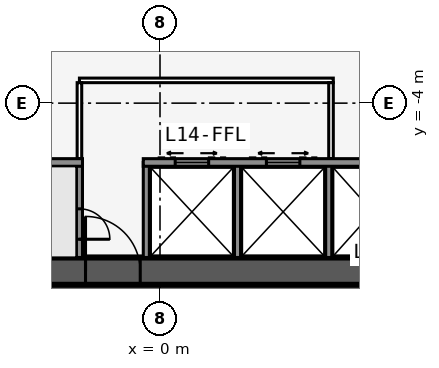
"""IFC4 building model, lengths in metres.
Left out: names, types, materials, properties, quantities, classifications, styles, units other than length and angle.
Written with IfcOpenShell. Run it as: python <this file> out.ifc"""

import sys

from ifc_helpers import new_model, si_unit, direction, frame, frame_2d, origin, place, context, subcontext, project, spatial, rectangle, extrude, element, fill, save


model = new_model("IFC4")
c1 = context("Model", 3, precision=1e-05, world=origin(), true_north=direction((0.0, 1.0)))
c2 = subcontext(c1, "Body", "Model", "MODEL_VIEW")
j1 = project(units=[si_unit("LENGTHUNIT", "METRE"), si_unit("PLANEANGLEUNIT", "RADIAN")], contexts=[c1])
p1 = place(None, origin())
s1 = spatial("IfcSite", under=j1, at=p1, CompositionType="ELEMENT")
p2 = place(p1, origin())
s2 = spatial("IfcBuilding", under=s1, at=p2, CompositionType="ELEMENT")
p3 = place(p2, frame((0.0, 0.0, 59.1)))
s3 = spatial("IfcBuildingStorey", under=s2, at=p3, CompositionType="ELEMENT", Elevation=59.1)
p4 = place(p3, frame((-16.5, -9.526, 0.0), z_axis=(0.0, 0.0, 1.0), x_axis=(1.0, 0.0, 0.0)))
e1 = element("IfcWall", 1, at=p4, inside=s3, PredefinedType="SHEAR", context=c2, shape_type="SweptSolid", body=[
    extrude(rectangle(XDim=33.0, YDim=0.9, at=frame_2d((16.5, 0.0))), origin(), (0.0, 0.0, 1.0), 3.4),
])
p5 = place(p4, frame((14.05, 0.0, 0.0)))
e2 = element("IfcOpeningElement", 2, at=p5, cuts=e1, PredefinedType="OPENING", context=c2, shape_type="SweptSolid", body=[
    extrude(rectangle(XDim=1.8, YDim=2.13, at=frame_2d((0.9, 1.065))), frame((0.0, 0.46, 0.0), z_axis=(0.0, -1.0, 0.0), x_axis=(1.0, 0.0, 0.0)), (0.0, 0.0, 1.0), 0.92),
])
p6 = place(p3, frame((-10.183, -5.951, 0.0), z_axis=(0.0, 0.0, 1.0), x_axis=(1.0, 0.0, 0.0)))
e3 = element("IfcWall", 3, at=p6, inside=s3, PredefinedType="SOLIDWALL", context=c2, shape_type="SweptSolid", body=[
    extrude(rectangle(XDim=7.633, YDim=0.25, at=frame_2d((3.816, 0.0))), origin(), (0.0, 0.0, 1.0), 3.235),
])
p7 = place(p3, frame((-0.55, -5.951, 0.0), z_axis=(0.0, 0.0, 1.0), x_axis=(1.0, 0.0, 0.0)))
e4 = element("IfcWall", 4, at=p7, inside=s3, PredefinedType="SOLIDWALL", context=c2, shape_type="SweptSolid", body=[
    extrude(rectangle(XDim=10.733, YDim=0.25, at=frame_2d((5.366, 0.0))), origin(), (0.0, 0.0, 1.0), 3.235),
])
p8 = place(p7, frame((9.314, 0.0, 0.0)))
e5 = element("IfcOpeningElement", 5, at=p8, cuts=e4, PredefinedType="OPENING", context=c2, shape_type="SweptSolid", body=[
    extrude(rectangle(XDim=0.9, YDim=2.13, at=frame_2d((0.45, 1.065))), frame((0.0, 0.135, 0.0), z_axis=(0.0, -1.0, 0.0), x_axis=(1.0, 0.0, 0.0)), (0.0, 0.0, 1.0), 0.27),
])
p9 = place(p7, frame((1.05, 0.0, 0.0)))
e6 = element("IfcOpeningElement", 6, at=p9, cuts=e4, PredefinedType="OPENING", context=c2, shape_type="SweptSolid", body=[
    extrude(rectangle(XDim=1.1, YDim=2.13, at=frame_2d((0.55, 1.065))), frame((0.0, 0.135, 0.0), z_axis=(0.0, -1.0, 0.0), x_axis=(1.0, 0.0, 0.0)), (0.0, 0.0, 1.0), 0.27),
])
p10 = place(p7, frame((4.05, 0.0, 0.0)))
e7 = element("IfcOpeningElement", 7, at=p10, cuts=e4, PredefinedType="OPENING", context=c2, shape_type="SweptSolid", body=[
    extrude(rectangle(XDim=1.1, YDim=2.13, at=frame_2d((0.55, 1.065))), frame((0.0, 0.135, 0.0), z_axis=(0.0, -1.0, 0.0), x_axis=(1.0, 0.0, 0.0)), (0.0, 0.0, 1.0), 0.27),
])
p11 = place(p3, frame((-2.65, -5.951, 0.0), z_axis=(0.0, 0.0, 1.0), x_axis=(0.0, -1.0, 0.0)))
e8 = element("IfcWall", 8, at=p11, inside=s3, PredefinedType="SOLIDWALL", context=c2, shape_type="SweptSolid", body=[
    extrude(rectangle(XDim=3.125, YDim=0.2, at=frame_2d((1.562, 0.0))), origin(), (0.0, 0.0, 1.0), 3.235),
])
p12 = place(p11, frame((1.525, 0.0, 0.0)))
e9 = element("IfcOpeningElement", 9, at=p12, cuts=e8, PredefinedType="OPENING", context=c2, shape_type="SweptSolid", body=[
    extrude(rectangle(XDim=1.0, YDim=2.13, at=frame_2d((0.5, 1.065))), frame((0.0, 0.11, 0.0), z_axis=(0.0, -1.0, 0.0), x_axis=(1.0, 0.0, 0.0)), (0.0, 0.0, 1.0), 0.22),
])
for number, where, z_axis, x_axis in (
    (10, (-0.45, -5.951, 0.0), (0.0, 0.0, 1.0), (0.0, -1.0, 0.0)),
    (11, (2.55, -5.951, 0.0), (0.0, 0.0, 1.0), (0.0, -1.0, 0.0)),
    (12, (5.55, -5.951, 0.0), (0.0, 0.0, 1.0), (0.0, -1.0, 0.0)),
):
    element("IfcWall", number, at=place(p3, frame(where, z_axis=z_axis, x_axis=x_axis)), inside=s3, PredefinedType="SOLIDWALL", context=c2, shape_type="SweptSolid", body=[
        extrude(rectangle(XDim=3.125, YDim=0.2, at=frame_2d((1.562, 0.0))), origin(), (0.0, 0.0, 1.0), 3.235),
    ])
p13 = place(p3, frame((16.5, -9.526, 0.0), z_axis=(0.0, 0.0, 1.0), x_axis=(-0.499999749417, 0.866025548458, 0.0)))
e13 = element("IfcWall", 13, at=p13, inside=s3, PredefinedType="SHEAR", context=c2, shape_type="SweptSolid", body=[
    extrude(rectangle(XDim=33.0, YDim=0.9, at=frame_2d((16.5, 0.0))), origin(), (0.0, 0.0, 1.0), 3.4),
])
p14 = place(p13, frame((14.15, 0.0, 0.0)))
e14 = element("IfcOpeningElement", 14, at=p14, cuts=e13, PredefinedType="OPENING", context=c2, shape_type="SweptSolid", body=[
    extrude(rectangle(XDim=1.8, YDim=2.13, at=frame_2d((0.9, 1.065))), frame((0.0, 0.46, 0.0), z_axis=(0.0, -1.0, 0.0), x_axis=(1.0, 0.0, 0.0)), (0.0, 0.0, 1.0), 0.92),
])
p15 = place(p13, frame((12.6, 0.0, 0.0)))
e15 = element("IfcOpeningElement", 15, at=p15, cuts=e13, PredefinedType="OPENING", context=c2, shape_type="SweptSolid", body=[
    extrude(rectangle(XDim=1.0, YDim=2.13, at=frame_2d((0.5, 1.065))), frame((0.0, 0.46, 0.0), z_axis=(0.0, -1.0, 0.0), x_axis=(1.0, 0.0, 0.0)), (0.0, 0.0, 1.0), 0.92),
])
p16 = place(p3, frame((10.245, -5.843, 0.0), z_axis=(0.0, 0.0, 1.0), x_axis=(-0.499993009313, 0.866029439822, 0.0)))
e16 = element("IfcWall", 16, at=p16, inside=s3, PredefinedType="SOLIDWALL", context=c2, shape_type="SweptSolid", body=[
    extrude(rectangle(XDim=7.733, YDim=0.25, at=frame_2d((3.866, 0.0))), origin(), (0.0, 0.0, 1.0), 3.235),
])
p17 = place(p3, frame((0.0, 19.052, 0.0), z_axis=(0.0, 0.0, 1.0), x_axis=(-0.499999749417, -0.866025548458, 0.0)))
e17 = element("IfcWall", 17, at=p17, inside=s3, PredefinedType="SHEAR", context=c2, shape_type="SweptSolid", body=[
    extrude(rectangle(XDim=33.0, YDim=0.9, at=frame_2d((16.5, 0.0))), origin(), (0.0, 0.0, 1.0), 3.4),
])
p18 = place(p17, frame((14.15, 0.0, 0.0)))
e18 = element("IfcOpeningElement", 18, at=p18, cuts=e17, PredefinedType="OPENING", context=c2, shape_type="SweptSolid", body=[
    extrude(rectangle(XDim=1.8, YDim=2.13, at=frame_2d((0.9, 1.065))), frame((0.0, 0.46, 0.0), z_axis=(0.0, -1.0, 0.0), x_axis=(1.0, 0.0, 0.0)), (0.0, 0.0, 1.0), 0.92),
])
p19 = place(p17, frame((12.6, 0.0, 0.0)))
e19 = element("IfcOpeningElement", 19, at=p19, cuts=e17, PredefinedType="OPENING", context=c2, shape_type="SweptSolid", body=[
    extrude(rectangle(XDim=1.0, YDim=2.13, at=frame_2d((0.5, 1.065))), frame((0.0, 0.46, 0.0), z_axis=(0.0, -1.0, 0.0), x_axis=(1.0, 0.0, 0.0)), (0.0, 0.0, 1.0), 0.92),
])
p20 = place(p3, frame((20.027, -10.985, 0.0), z_axis=(0.0, 0.0, 1.0), x_axis=(-0.500001677587, 0.866024435227, 0.0)))
e20 = element("IfcWall", 20, at=p20, inside=s3, PredefinedType="PARTITIONING", context=c2, shape_type="SweptSolid", body=[
    extrude(rectangle(XDim=39.054, YDim=0.15, at=frame_2d((19.527, 0.0))), origin(), (0.0, 0.0, 1.0), 3.235),
])
p21 = place(p20, frame((0.352, 0.0, 0.0)))
e21 = element("IfcOpeningElement", 21, at=p21, cuts=e20, PredefinedType="OPENING", context=c2, shape_type="SweptSolid", body=[
    extrude(rectangle(XDim=0.95, YDim=2.13, at=frame_2d((0.475, 1.065))), frame((0.0, 0.085, 0.0), z_axis=(0.0, -1.0, 0.0), x_axis=(1.0, 0.0, 0.0)), (0.0, 0.0, 1.0), 0.17),
])
p22 = place(p20, frame((10.352, 0.0, 0.0)))
e22 = element("IfcOpeningElement", 22, at=p22, cuts=e20, PredefinedType="OPENING", context=c2, shape_type="SweptSolid", body=[
    extrude(rectangle(XDim=0.95, YDim=2.13, at=frame_2d((0.475, 1.065))), frame((0.0, 0.085, 0.0), z_axis=(0.0, -1.0, 0.0), x_axis=(1.0, 0.0, 0.0)), (0.0, 0.0, 1.0), 0.17),
])
p23 = place(p20, frame((17.152, 0.0, 0.0)))
e23 = element("IfcOpeningElement", 23, at=p23, cuts=e20, PredefinedType="OPENING", context=c2, shape_type="SweptSolid", body=[
    extrude(rectangle(XDim=0.95, YDim=2.13, at=frame_2d((0.475, 1.065))), frame((0.0, 0.085, 0.0), z_axis=(0.0, -1.0, 0.0), x_axis=(1.0, 0.0, 0.0)), (0.0, 0.0, 1.0), 0.17),
])
p24 = place(p20, frame((20.952, 0.0, 0.0)))
e24 = element("IfcOpeningElement", 24, at=p24, cuts=e20, PredefinedType="OPENING", context=c2, shape_type="SweptSolid", body=[
    extrude(rectangle(XDim=0.95, YDim=2.13, at=frame_2d((0.475, 1.065))), frame((0.0, 0.085, 0.0), z_axis=(0.0, -1.0, 0.0), x_axis=(1.0, 0.0, 0.0)), (0.0, 0.0, 1.0), 0.17),
])
p25 = place(p20, frame((27.752, 0.0, 0.0)))
e25 = element("IfcOpeningElement", 25, at=p25, cuts=e20, PredefinedType="OPENING", context=c2, shape_type="SweptSolid", body=[
    extrude(rectangle(XDim=0.95, YDim=2.13, at=frame_2d((0.475, 1.065))), frame((0.0, 0.085, 0.0), z_axis=(0.0, -1.0, 0.0), x_axis=(1.0, 0.0, 0.0)), (0.0, 0.0, 1.0), 0.17),
])
p26 = place(p20, frame((37.752, 0.0, 0.0)))
e26 = element("IfcOpeningElement", 26, at=p26, cuts=e20, PredefinedType="OPENING", context=c2, shape_type="SweptSolid", body=[
    extrude(rectangle(XDim=0.95, YDim=2.13, at=frame_2d((0.475, 1.065))), frame((0.0, 0.085, 0.0), z_axis=(0.0, -1.0, 0.0), x_axis=(1.0, 0.0, 0.0)), (0.0, 0.0, 1.0), 0.17),
])
p27 = place(p3, frame((-0.5, 24.636, 0.0), z_axis=(0.0, 0.0, 1.0), x_axis=(-0.500001915564, -0.86602429783, 0.0)))
e27 = element("IfcWall", 27, at=p27, inside=s3, PredefinedType="PARTITIONING", context=c2, shape_type="SweptSolid", body=[
    extrude(rectangle(XDim=42.172, YDim=0.15, at=frame_2d((21.086, 0.0))), origin(), (0.0, 0.0, 1.0), 3.235),
])
p28 = place(p27, frame((2.338, 0.0, 0.0)))
e28 = element("IfcOpeningElement", 28, at=p28, cuts=e27, PredefinedType="OPENING", context=c2, shape_type="SweptSolid", body=[
    extrude(rectangle(XDim=0.95, YDim=2.13, at=frame_2d((0.475, 1.065))), frame((0.0, 0.085, 0.0), z_axis=(0.0, -1.0, 0.0), x_axis=(1.0, 0.0, 0.0)), (0.0, 0.0, 1.0), 0.17),
])
p29 = place(p27, frame((12.511, 0.0, 0.0)))
e29 = element("IfcOpeningElement", 29, at=p29, cuts=e27, PredefinedType="OPENING", context=c2, shape_type="SweptSolid", body=[
    extrude(rectangle(XDim=0.95, YDim=2.13, at=frame_2d((0.475, 1.065))), frame((0.0, 0.085, 0.0), z_axis=(0.0, -1.0, 0.0), x_axis=(1.0, 0.0, 0.0)), (0.0, 0.0, 1.0), 0.17),
])
p30 = place(p27, frame((19.311, 0.0, 0.0)))
e30 = element("IfcOpeningElement", 30, at=p30, cuts=e27, PredefinedType="OPENING", context=c2, shape_type="SweptSolid", body=[
    extrude(rectangle(XDim=0.95, YDim=2.13, at=frame_2d((0.475, 1.065))), frame((0.0, 0.085, 0.0), z_axis=(0.0, -1.0, 0.0), x_axis=(1.0, 0.0, 0.0)), (0.0, 0.0, 1.0), 0.17),
])
p31 = place(p27, frame((28.111, 0.0, 0.0)))
e31 = element("IfcOpeningElement", 31, at=p31, cuts=e27, PredefinedType="OPENING", context=c2, shape_type="SweptSolid", body=[
    extrude(rectangle(XDim=0.95, YDim=2.13, at=frame_2d((0.475, 1.065))), frame((0.0, 0.085, 0.0), z_axis=(0.0, -1.0, 0.0), x_axis=(1.0, 0.0, 0.0)), (0.0, 0.0, 1.0), 0.17),
])
p32 = place(p27, frame((39.311, 0.0, 0.0)))
e32 = element("IfcOpeningElement", 32, at=p32, cuts=e27, PredefinedType="OPENING", context=c2, shape_type="SweptSolid", body=[
    extrude(rectangle(XDim=0.95, YDim=2.13, at=frame_2d((0.475, 1.065))), frame((0.0, 0.085, 0.0), z_axis=(0.0, -1.0, 0.0), x_axis=(1.0, 0.0, 0.0)), (0.0, 0.0, 1.0), 0.17),
])
p33 = place(p3, frame((-2.65, -3.251, 0.0), z_axis=(0.0, 0.0, 1.0), x_axis=(1.0, 0.0, 0.0)))
e33 = element("IfcWall", 33, at=p33, inside=s3, PredefinedType="PARTITIONING", context=c2, shape_type="SweptSolid", body=[
    extrude(rectangle(XDim=8.35, YDim=0.15, at=frame_2d((4.175, 0.0))), origin(), (0.0, 0.0, 1.0), 3.235),
])
for number, where, z_axis, x_axis in (
    (34, (-2.65, -5.826, 0.0), (0.0, 0.0, 1.0), (0.0, 1.0, 0.0)),
    (35, (5.625, -5.826, 0.0), (0.0, 0.0, 1.0), (0.0, 1.0, 0.0)),
):
    element("IfcWall", number, at=place(p3, frame(where, z_axis=z_axis, x_axis=x_axis)), inside=s3, PredefinedType="PARTITIONING", context=c2, shape_type="SweptSolid", body=[
        extrude(rectangle(XDim=2.5, YDim=0.15, at=frame_2d((1.25, 0.0))), origin(), (0.0, 0.0, 1.0), 3.235),
    ])
p34 = place(p5, origin())
e36 = element("IfcDoor", 36, at=p34, inside=s3, OperationType="DOUBLE_DOOR_SINGLE_SWING", PredefinedType="DOOR", context=c2, shape_type="SweptSolid", body=[
    extrude(rectangle(XDim=1.8, YDim=2.13, at=frame_2d((0.9, 1.065))), frame((0.0, 0.025, 0.0), z_axis=(0.0, -1.0, 0.0), x_axis=(1.0, 0.0, 0.0)), (0.0, 0.0, 1.0), 0.05),
])
fill(e2, e36)
p35 = place(p12, origin())
e37 = element("IfcDoor", 37, at=p35, inside=s3, OperationType="SINGLE_SWING_RIGHT", PredefinedType="DOOR", context=c2, shape_type="SweptSolid", body=[
    extrude(rectangle(XDim=1.0, YDim=2.13, at=frame_2d((0.5, 1.065))), frame((0.0, 0.025, 0.0), z_axis=(0.0, -1.0, 0.0), x_axis=(1.0, 0.0, 0.0)), (0.0, 0.0, 1.0), 0.05),
])
fill(e9, e37)
p36 = place(p9, origin())
e38 = element("IfcDoor", 38, at=p36, inside=s3, OperationType="DOUBLE_DOOR_SLIDING", PredefinedType="USERDEFINED", context=c2, shape_type="SweptSolid", body=[
    extrude(rectangle(XDim=1.1, YDim=2.13, at=frame_2d((0.55, 1.065))), frame((0.0, 0.025, 0.0), z_axis=(0.0, -1.0, 0.0), x_axis=(1.0, 0.0, 0.0)), (0.0, 0.0, 1.0), 0.05),
])
fill(e6, e38)
p37 = place(p10, origin())
e39 = element("IfcDoor", 39, at=p37, inside=s3, OperationType="DOUBLE_DOOR_SLIDING", PredefinedType="USERDEFINED", context=c2, shape_type="SweptSolid", body=[
    extrude(rectangle(XDim=1.1, YDim=2.13, at=frame_2d((0.55, 1.065))), frame((0.0, 0.025, 0.0), z_axis=(0.0, -1.0, 0.0), x_axis=(1.0, 0.0, 0.0)), (0.0, 0.0, 1.0), 0.05),
])
fill(e7, e39)
save(model, sys.argv[1])
